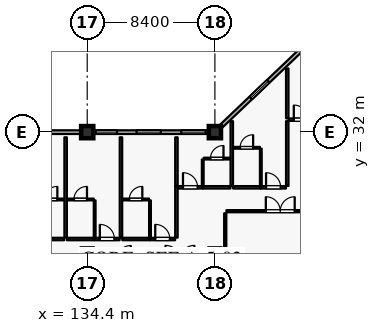
"""IFC4 building model, lengths in metres.
Left out: names, types, materials, properties, quantities, classifications, styles, units other than length and angle.
Written with IfcOpenShell. Run it as: python <this file> out.ifc"""

import sys

from ifc_helpers import new_model, si_unit, direction, frame, frame_2d, origin, origin_2d, place, context, subcontext, project, spatial, rectangle, extrude, element, fill, save


model = new_model("IFC4")
c1 = context("Model", 3, precision=1e-05, world=origin(), true_north=direction((0.0, 1.0)))
c2 = subcontext(c1, "Body", "Model", "MODEL_VIEW")
j1 = project(units=[si_unit("LENGTHUNIT", "METRE"), si_unit("PLANEANGLEUNIT", "RADIAN")], contexts=[c1])
p1 = place(None, origin())
s1 = spatial("IfcSite", under=j1, at=p1, CompositionType="ELEMENT")
p2 = place(p1, origin())
s2 = spatial("IfcBuilding", under=s1, at=p2, CompositionType="ELEMENT")
p3 = place(p2, frame((0.0, 0.0, 11.4)))
s3 = spatial("IfcBuildingStorey", under=s2, at=p3, CompositionType="ELEMENT", Elevation=11.4)
for number, where, z_axis, x_axis in (
    (1, (134.4, 32.0, 0.0), (0.0, 0.0, 1.0), (1.0, 0.0, 0.0)),
    (2, (142.8, 32.0, 0.0), (0.0, 0.0, 1.0), (1.0, 0.0, 0.0)),
):
    element("IfcColumn", number, at=place(p3, frame(where, z_axis=z_axis, x_axis=x_axis)), inside=s3, PredefinedType="COLUMN", context=c2, shape_type="SweptSolid", body=[
        extrude(rectangle(XDim=0.8, YDim=0.8, at=origin_2d()), origin(), (0.0, 0.0, 1.0), 4.8),
    ])
for number, where, z_axis, x_axis in (
    (3, (134.4, 24.0, 0.0), (0.0, 0.0, 1.0), (1.0, 0.0, 0.0)),
    (4, (142.8, 24.0, 0.0), (0.0, 0.0, 1.0), (1.0, 0.0, 0.0)),
):
    element("IfcColumn", number, at=place(p3, frame(where, z_axis=z_axis, x_axis=x_axis)), inside=s3, PredefinedType="COLUMN", context=c2, shape_type="SweptSolid", body=[
        extrude(rectangle(XDim=0.7, YDim=0.7, at=origin_2d()), origin(), (0.0, 0.0, 1.0), 4.8),
    ])
p4 = place(p3, frame((126.4, 32.0, 0.0), z_axis=(0.0, 0.0, 1.0), x_axis=(1.0, 0.0, 0.0)))
e5 = element("IfcWall", 5, at=p4, inside=s3, PredefinedType="SOLIDWALL", context=c2, shape_type="SweptSolid", body=[
    extrude(rectangle(XDim=7.6, YDim=0.24, at=frame_2d((3.8, 0.0))), origin(), (0.0, 0.0, 1.0), 4.1),
])
p5 = place(p4, frame((0.615, 0.0, 0.8)))
e6 = element("IfcOpeningElement", 6, at=p5, cuts=e5, PredefinedType="OPENING", context=c2, shape_type="SweptSolid", body=[
    extrude(rectangle(XDim=1.6, YDim=1.6, at=frame_2d((0.8, 0.8))), frame((0.0, 0.13, 0.0), z_axis=(0.0, -1.0, 0.0), x_axis=(1.0, 0.0, 0.0)), (0.0, 0.0, 1.0), 0.26),
])
p6 = place(p4, frame((3.955, 0.0, 0.8)))
e7 = element("IfcOpeningElement", 7, at=p6, cuts=e5, PredefinedType="OPENING", context=c2, shape_type="SweptSolid", body=[
    extrude(rectangle(XDim=1.6, YDim=1.6, at=frame_2d((0.8, 0.8))), frame((0.0, 0.13, 0.0), z_axis=(0.0, -1.0, 0.0), x_axis=(1.0, 0.0, 0.0)), (0.0, 0.0, 1.0), 0.26),
])
p7 = place(p3, frame((134.8, 32.0, 0.0), z_axis=(0.0, 0.0, 1.0), x_axis=(1.0, 0.0, 0.0)))
e8 = element("IfcWall", 8, at=p7, inside=s3, PredefinedType="SOLIDWALL", context=c2, shape_type="SweptSolid", body=[
    extrude(rectangle(XDim=7.6, YDim=0.24, at=frame_2d((3.8, 0.0))), origin(), (0.0, 0.0, 1.0), 4.13),
])
p8 = place(p7, frame((0.16, 0.0, 0.8)))
e9 = element("IfcOpeningElement", 9, at=p8, cuts=e8, PredefinedType="OPENING", context=c2, shape_type="SweptSolid", body=[
    extrude(rectangle(XDim=1.4, YDim=1.6, at=frame_2d((0.7, 0.8))), frame((0.0, 0.13, 0.0), z_axis=(0.0, -1.0, 0.0), x_axis=(1.0, 0.0, 0.0)), (0.0, 0.0, 1.0), 0.26),
])
p9 = place(p7, frame((2.845, 0.0, 0.8)))
e10 = element("IfcOpeningElement", 10, at=p9, cuts=e8, PredefinedType="OPENING", context=c2, shape_type="SweptSolid", body=[
    extrude(rectangle(XDim=1.6, YDim=1.6, at=frame_2d((0.8, 0.8))), frame((0.0, 0.13, 0.0), z_axis=(0.0, -1.0, 0.0), x_axis=(1.0, 0.0, 0.0)), (0.0, 0.0, 1.0), 0.26),
])
p10 = place(p7, frame((5.785, 0.0, 0.8)))
e11 = element("IfcOpeningElement", 11, at=p10, cuts=e8, PredefinedType="OPENING", context=c2, shape_type="SweptSolid", body=[
    extrude(rectangle(XDim=1.6, YDim=1.6, at=frame_2d((0.8, 0.8))), frame((0.0, 0.13, 0.0), z_axis=(0.0, -1.0, 0.0), x_axis=(1.0, 0.0, 0.0)), (0.0, 0.0, 1.0), 0.26),
])
p11 = place(p3, frame((143.2, 32.381, 0.0), z_axis=(0.0, 0.0, 1.0), x_axis=(0.724156739794, 0.689635422677, 0.0)))
e12 = element("IfcWall", 12, at=p11, inside=s3, PredefinedType="SOLIDWALL", context=c2, shape_type="SweptSolid", body=[
    extrude(rectangle(XDim=10.495, YDim=0.24, at=frame_2d((5.248, 0.0))), origin(), (0.0, 0.0, 1.0), 4.13),
])
p12 = place(p11, frame((2.701, 0.0, 0.8)))
e13 = element("IfcOpeningElement", 13, at=p12, cuts=e12, PredefinedType="OPENING", context=c2, shape_type="SweptSolid", body=[
    extrude(rectangle(XDim=1.6, YDim=1.6, at=frame_2d((0.8, 0.8))), frame((0.0, 0.13, 0.0), z_axis=(0.0, -1.0, 0.0), x_axis=(1.0, 0.0, 0.0)), (0.0, 0.0, 1.0), 0.26),
])
p13 = place(p11, frame((7.527, 0.0, 0.8)))
e14 = element("IfcOpeningElement", 14, at=p13, cuts=e12, PredefinedType="OPENING", context=c2, shape_type="SweptSolid", body=[
    extrude(rectangle(XDim=1.6, YDim=1.6, at=frame_2d((0.8, 0.8))), frame((0.0, 0.13, 0.0), z_axis=(0.0, -1.0, 0.0), x_axis=(1.0, 0.0, 0.0)), (0.0, 0.0, 1.0), 0.26),
])
p14 = place(p3, frame((131.08, 24.97, 0.0), z_axis=(0.0, 0.0, 1.0), x_axis=(1.0, 0.0, 0.0)))
e15 = element("IfcWall", 15, at=p14, inside=s3, PredefinedType="PARTITIONING", context=c2, shape_type="SweptSolid", body=[
    extrude(rectangle(XDim=1.81, YDim=0.16, at=frame_2d((0.905, 0.0))), origin(), (0.0, 0.0, 1.0), 4.535),
])
p15 = place(p3, frame((131.13, 27.57, 0.0), z_axis=(0.0, 0.0, 1.0), x_axis=(1.0, 0.0, 0.0)))
e16 = element("IfcWall", 16, at=p15, inside=s3, PredefinedType="PARTITIONING", context=c2, shape_type="SweptSolid", body=[
    extrude(rectangle(XDim=1.75, YDim=0.115, at=frame_2d((0.875, 0.0))), origin(), (0.0, 0.0, 1.0), 4.535),
])
p16 = place(p15, frame((0.445, 0.0, 0.0)))
e17 = element("IfcOpeningElement", 17, at=p16, cuts=e16, PredefinedType="OPENING", context=c2, shape_type="SweptSolid", body=[
    extrude(rectangle(XDim=0.86, YDim=2.12, at=frame_2d((0.43, 1.06))), frame((0.0, 0.067, 0.0), z_axis=(0.0, -1.0, 0.0), x_axis=(1.0, 0.0, 0.0)), (0.0, 0.0, 1.0), 0.135),
])
p17 = place(p3, frame((133.07, 24.97, 0.0), z_axis=(0.0, 0.0, 1.0), x_axis=(1.0, 0.0, 0.0)))
e18 = element("IfcWall", 18, at=p17, inside=s3, PredefinedType="PARTITIONING", context=c2, shape_type="SweptSolid", body=[
    extrude(rectangle(XDim=1.81, YDim=0.16, at=frame_2d((0.905, 0.0))), origin(), (0.0, 0.0, 1.0), 4.535),
])
p18 = place(p3, frame((134.89, 24.97, 0.0), z_axis=(0.0, 0.0, 1.0), x_axis=(1.0, 0.0, 0.0)))
e19 = element("IfcWall", 19, at=p18, inside=s3, PredefinedType="PARTITIONING", context=c2, shape_type="SweptSolid", body=[
    extrude(rectangle(XDim=1.64, YDim=0.16, at=frame_2d((0.82, 0.0))), origin(), (0.0, 0.0, 1.0), 4.535),
])
p19 = place(p18, frame((0.34, 0.0, 0.0)))
e20 = element("IfcOpeningElement", 20, at=p19, cuts=e19, PredefinedType="OPENING", context=c2, shape_type="SweptSolid", body=[
    extrude(rectangle(XDim=0.96, YDim=2.2, at=frame_2d((0.48, 1.1))), frame((0.0, 0.09, 0.0), z_axis=(0.0, -1.0, 0.0), x_axis=(1.0, 0.0, 0.0)), (0.0, 0.0, 1.0), 0.18),
])
p20 = place(p3, frame((134.89, 25.06, 0.0), z_axis=(0.0, 0.0, 1.0), x_axis=(0.0, 1.0, 0.0)))
e21 = element("IfcWall", 21, at=p20, inside=s3, PredefinedType="PARTITIONING", context=c2, shape_type="SweptSolid", body=[
    extrude(rectangle(XDim=2.45, YDim=0.115, at=frame_2d((1.225, 0.0))), origin(), (0.0, 0.0, 1.0), 4.535),
])
p21 = place(p3, frame((133.08, 27.57, 0.0), z_axis=(0.0, 0.0, 1.0), x_axis=(1.0, 0.0, 0.0)))
e22 = element("IfcWall", 22, at=p21, inside=s3, PredefinedType="PARTITIONING", context=c2, shape_type="SweptSolid", body=[
    extrude(rectangle(XDim=1.75, YDim=0.115, at=frame_2d((0.875, 0.0))), origin(), (0.0, 0.0, 1.0), 4.535),
])
p22 = place(p21, frame((0.445, 0.0, 0.0)))
e23 = element("IfcOpeningElement", 23, at=p22, cuts=e22, PredefinedType="OPENING", context=c2, shape_type="SweptSolid", body=[
    extrude(rectangle(XDim=0.86, YDim=2.12, at=frame_2d((0.43, 1.06))), frame((0.0, 0.067, 0.0), z_axis=(0.0, -1.0, 0.0), x_axis=(1.0, 0.0, 0.0)), (0.0, 0.0, 1.0), 0.135),
])
p23 = place(p3, frame((132.98, 25.06, 0.0), z_axis=(0.0, 0.0, 1.0), x_axis=(0.0, 1.0, 0.0)))
e24 = element("IfcWall", 24, at=p23, inside=s3, PredefinedType="PARTITIONING", context=c2, shape_type="SweptSolid", body=[
    extrude(rectangle(XDim=6.6, YDim=0.16, at=frame_2d((3.3, 0.0))), origin(), (0.0, 0.0, 1.0), 4.535),
])
p24 = place(p3, frame((136.71, 24.97, 0.0), z_axis=(0.0, 0.0, 1.0), x_axis=(1.0, 0.0, 0.0)))
e25 = element("IfcWall", 25, at=p24, inside=s3, PredefinedType="PARTITIONING", context=c2, shape_type="SweptSolid", body=[
    extrude(rectangle(XDim=1.81, YDim=0.16, at=frame_2d((0.905, 0.0))), origin(), (0.0, 0.0, 1.0), 4.535),
])
p25 = place(p3, frame((138.53, 24.97, 0.0), z_axis=(0.0, 0.0, 1.0), x_axis=(1.0, 0.0, 0.0)))
e26 = element("IfcWall", 26, at=p25, inside=s3, PredefinedType="PARTITIONING", context=c2, shape_type="SweptSolid", body=[
    extrude(rectangle(XDim=1.65, YDim=0.16, at=frame_2d((0.825, 0.0))), origin(), (0.0, 0.0, 1.0), 4.535),
])
p26 = place(p25, frame((0.345, 0.0, 0.0)))
e27 = element("IfcOpeningElement", 27, at=p26, cuts=e26, PredefinedType="OPENING", context=c2, shape_type="SweptSolid", body=[
    extrude(rectangle(XDim=0.96, YDim=2.2, at=frame_2d((0.48, 1.1))), frame((0.0, 0.09, 0.0), z_axis=(0.0, -1.0, 0.0), x_axis=(1.0, 0.0, 0.0)), (0.0, 0.0, 1.0), 0.18),
])
p27 = place(p3, frame((138.53, 25.06, 0.0), z_axis=(0.0, 0.0, 1.0), x_axis=(0.0, 1.0, 0.0)))
e28 = element("IfcWall", 28, at=p27, inside=s3, PredefinedType="PARTITIONING", context=c2, shape_type="SweptSolid", body=[
    extrude(rectangle(XDim=2.45, YDim=0.115, at=frame_2d((1.225, 0.0))), origin(), (0.0, 0.0, 1.0), 4.535),
])
p28 = place(p3, frame((136.72, 27.57, 0.0), z_axis=(0.0, 0.0, 1.0), x_axis=(1.0, 0.0, 0.0)))
e29 = element("IfcWall", 29, at=p28, inside=s3, PredefinedType="PARTITIONING", context=c2, shape_type="SweptSolid", body=[
    extrude(rectangle(XDim=1.75, YDim=0.115, at=frame_2d((0.875, 0.0))), origin(), (0.0, 0.0, 1.0), 4.535),
])
p29 = place(p28, frame((0.445, 0.0, 0.0)))
e30 = element("IfcOpeningElement", 30, at=p29, cuts=e29, PredefinedType="OPENING", context=c2, shape_type="SweptSolid", body=[
    extrude(rectangle(XDim=0.86, YDim=2.12, at=frame_2d((0.43, 1.06))), frame((0.0, 0.067, 0.0), z_axis=(0.0, -1.0, 0.0), x_axis=(1.0, 0.0, 0.0)), (0.0, 0.0, 1.0), 0.135),
])
p30 = place(p3, frame((136.62, 25.06, 0.0), z_axis=(0.0, 0.0, 1.0), x_axis=(0.0, 1.0, 0.0)))
e31 = element("IfcWall", 31, at=p30, inside=s3, PredefinedType="PARTITIONING", context=c2, shape_type="SweptSolid", body=[
    extrude(rectangle(XDim=6.6, YDim=0.16, at=frame_2d((3.3, 0.0))), origin(), (0.0, 0.0, 1.0), 4.535),
])
p31 = place(p3, frame((140.27, 25.06, 0.0), z_axis=(0.0, 0.0, 1.0), x_axis=(0.0, 1.0, 0.0)))
e32 = element("IfcWall", 32, at=p31, inside=s3, PredefinedType="PARTITIONING", context=c2, shape_type="SweptSolid", body=[
    extrude(rectangle(XDim=3.39, YDim=0.16, at=frame_2d((1.695, 0.0))), origin(), (0.0, 0.0, 1.0), 4.535),
])
p32 = place(p3, frame((140.36, 28.37, 0.0), z_axis=(0.0, 0.0, 1.0), x_axis=(1.0, 0.0, 0.0)))
e33 = element("IfcWall", 33, at=p32, inside=s3, PredefinedType="PARTITIONING", context=c2, shape_type="SweptSolid", body=[
    extrude(rectangle(XDim=1.64, YDim=0.16, at=frame_2d((0.82, 0.0))), origin(), (0.0, 0.0, 1.0), 4.535),
])
p33 = place(p32, frame((0.34, 0.0, 0.0)))
e34 = element("IfcOpeningElement", 34, at=p33, cuts=e33, PredefinedType="OPENING", context=c2, shape_type="SweptSolid", body=[
    extrude(rectangle(XDim=0.96, YDim=2.2, at=frame_2d((0.48, 1.1))), frame((0.0, 0.09, 0.0), z_axis=(0.0, -1.0, 0.0), x_axis=(1.0, 0.0, 0.0)), (0.0, 0.0, 1.0), 0.18),
])
p34 = place(p3, frame((142.01, 28.37, 0.0), z_axis=(0.0, 0.0, 1.0), x_axis=(1.0, 0.0, 0.0)))
e35 = element("IfcWall", 35, at=p34, inside=s3, PredefinedType="PARTITIONING", context=c2, shape_type="SweptSolid", body=[
    extrude(rectangle(XDim=1.81, YDim=0.16, at=frame_2d((0.905, 0.0))), origin(), (0.0, 0.0, 1.0), 4.535),
])
p35 = place(p3, frame((142.0, 28.46, 0.0), z_axis=(0.0, 0.0, 1.0), x_axis=(0.0, 1.0, 0.0)))
e36 = element("IfcWall", 36, at=p35, inside=s3, PredefinedType="PARTITIONING", context=c2, shape_type="SweptSolid", body=[
    extrude(rectangle(XDim=1.74, YDim=0.115, at=frame_2d((0.87, 0.0))), origin(), (0.0, 0.0, 1.0), 4.535),
])
p36 = place(p3, frame((142.06, 30.26, 0.0), z_axis=(0.0, 0.0, 1.0), x_axis=(1.0, 0.0, 0.0)))
e37 = element("IfcWall", 37, at=p36, inside=s3, PredefinedType="PARTITIONING", context=c2, shape_type="SweptSolid", body=[
    extrude(rectangle(XDim=1.75, YDim=0.115, at=frame_2d((0.875, 0.0))), origin(), (0.0, 0.0, 1.0), 4.535),
])
p37 = place(p36, frame((0.445, 0.0, 0.0)))
e38 = element("IfcOpeningElement", 38, at=p37, cuts=e37, PredefinedType="OPENING", context=c2, shape_type="SweptSolid", body=[
    extrude(rectangle(XDim=0.86, YDim=2.12, at=frame_2d((0.43, 1.06))), frame((0.0, 0.067, 0.0), z_axis=(0.0, -1.0, 0.0), x_axis=(1.0, 0.0, 0.0)), (0.0, 0.0, 1.0), 0.135),
])
p38 = place(p3, frame((140.27, 28.46, 0.0), z_axis=(0.0, 0.0, 1.0), x_axis=(0.0, 1.0, 0.0)))
e39 = element("IfcWall", 39, at=p38, inside=s3, PredefinedType="PARTITIONING", context=c2, shape_type="SweptSolid", body=[
    extrude(rectangle(XDim=3.2, YDim=0.16, at=frame_2d((1.6, 0.0))), origin(), (0.0, 0.0, 1.0), 4.535),
])
p39 = place(p3, frame((144.0, 28.37, 0.0), z_axis=(0.0, 0.0, 1.0), x_axis=(1.0, 0.0, 0.0)))
e40 = element("IfcWall", 40, at=p39, inside=s3, PredefinedType="PARTITIONING", context=c2, shape_type="SweptSolid", body=[
    extrude(rectangle(XDim=1.81, YDim=0.16, at=frame_2d((0.905, 0.0))), origin(), (0.0, 0.0, 1.0), 4.535),
])
p40 = place(p3, frame((145.82, 28.37, 0.0), z_axis=(0.0, 0.0, 1.0), x_axis=(1.0, 0.0, 0.0)))
e41 = element("IfcWall", 41, at=p40, inside=s3, PredefinedType="PARTITIONING", context=c2, shape_type="SweptSolid", body=[
    extrude(rectangle(XDim=1.65, YDim=0.16, at=frame_2d((0.825, 0.0))), origin(), (0.0, 0.0, 1.0), 4.535),
])
p41 = place(p40, frame((0.345, 0.0, 0.0)))
e42 = element("IfcOpeningElement", 42, at=p41, cuts=e41, PredefinedType="OPENING", context=c2, shape_type="SweptSolid", body=[
    extrude(rectangle(XDim=0.96, YDim=2.2, at=frame_2d((0.48, 1.1))), frame((0.0, 0.09, 0.0), z_axis=(0.0, -1.0, 0.0), x_axis=(1.0, 0.0, 0.0)), (0.0, 0.0, 1.0), 0.18),
])
p42 = place(p3, frame((145.82, 28.46, 0.0), z_axis=(0.0, 0.0, 1.0), x_axis=(0.0, 1.0, 0.0)))
e43 = element("IfcWall", 43, at=p42, inside=s3, PredefinedType="PARTITIONING", context=c2, shape_type="SweptSolid", body=[
    extrude(rectangle(XDim=2.45, YDim=0.115, at=frame_2d((1.225, 0.0))), origin(), (0.0, 0.0, 1.0), 4.535),
])
p43 = place(p3, frame((144.01, 30.97, 0.0), z_axis=(0.0, 0.0, 1.0), x_axis=(1.0, 0.0, 0.0)))
e44 = element("IfcWall", 44, at=p43, inside=s3, PredefinedType="PARTITIONING", context=c2, shape_type="SweptSolid", body=[
    extrude(rectangle(XDim=1.75, YDim=0.115, at=frame_2d((0.875, 0.0))), origin(), (0.0, 0.0, 1.0), 4.535),
])
p44 = place(p43, frame((0.445, 0.0, 0.0)))
e45 = element("IfcOpeningElement", 45, at=p44, cuts=e44, PredefinedType="OPENING", context=c2, shape_type="SweptSolid", body=[
    extrude(rectangle(XDim=0.86, YDim=2.12, at=frame_2d((0.43, 1.06))), frame((0.0, 0.067, 0.0), z_axis=(0.0, -1.0, 0.0), x_axis=(1.0, 0.0, 0.0)), (0.0, 0.0, 1.0), 0.135),
])
for number, where, z_axis, x_axis in (
    (46, (143.91, 28.46, 0.0), (0.0, 0.0, 1.0), (0.0, 1.0, 0.0)),
    (47, (147.56, 28.46, 0.0), (0.0, 0.0, 1.0), (0.0, 1.0, 0.0)),
):
    element("IfcWall", number, at=place(p3, frame(where, z_axis=z_axis, x_axis=x_axis)), inside=s3, PredefinedType="PARTITIONING", context=c2, shape_type="SweptSolid", body=[
        extrude(rectangle(XDim=4.26, YDim=0.16, at=frame_2d((2.13, 0.0))), origin(), (0.0, 0.0, 1.0), 4.535),
    ])
p45 = place(p3, frame((147.65, 32.82, 0.0), z_axis=(0.0, 0.0, 1.0), x_axis=(1.0, 0.0, 0.0)))
e48 = element("IfcWall", 48, at=p45, inside=s3, PredefinedType="PARTITIONING", context=c2, shape_type="SweptSolid", body=[
    extrude(rectangle(XDim=1.64, YDim=0.16, at=frame_2d((0.82, 0.0))), origin(), (0.0, 0.0, 1.0), 4.535),
])
p46 = place(p45, frame((0.34, 0.0, 0.0)))
e49 = element("IfcOpeningElement", 49, at=p46, cuts=e48, PredefinedType="OPENING", context=c2, shape_type="SweptSolid", body=[
    extrude(rectangle(XDim=0.96, YDim=2.2, at=frame_2d((0.48, 1.1))), frame((0.0, 0.09, 0.0), z_axis=(0.0, -1.0, 0.0), x_axis=(1.0, 0.0, 0.0)), (0.0, 0.0, 1.0), 0.18),
])
p47 = place(p3, frame((147.56, 32.91, 0.0), z_axis=(0.0, 0.0, 1.0), x_axis=(0.0, 1.0, 0.0)))
e50 = element("IfcWall", 50, at=p47, inside=s3, PredefinedType="PARTITIONING", context=c2, shape_type="SweptSolid", body=[
    extrude(rectangle(XDim=3.28, YDim=0.16, at=frame_2d((1.64, 0.0))), origin(), (0.0, 0.0, 1.0), 4.535),
])
p48 = place(p3, frame((143.56, 26.8, 0.0), z_axis=(0.0, 0.0, 1.0), x_axis=(1.0, 0.0, 0.0)))
e51 = element("IfcWall", 51, at=p48, inside=s3, PredefinedType="PARTITIONING", context=c2, shape_type="SweptSolid", body=[
    extrude(rectangle(XDim=7.08, YDim=0.14, at=frame_2d((3.54, 0.0))), origin(), (0.0, 0.0, 1.0), 4.535),
])
p49 = place(p48, frame((2.59, 0.0, 0.0)))
e52 = element("IfcOpeningElement", 52, at=p49, cuts=e51, PredefinedType="OPENING", context=c2, shape_type="SweptSolid", body=[
    extrude(rectangle(XDim=1.9, YDim=2.4, at=frame_2d((0.95, 1.2))), frame((0.0, 0.08, 0.0), z_axis=(0.0, -1.0, 0.0), x_axis=(1.0, 0.0, 0.0)), (0.0, 0.0, 1.0), 0.16),
])
p50 = place(p3, frame((143.48, 23.45, 0.0), z_axis=(0.0, 0.0, 1.0), x_axis=(0.0, 1.0, 0.0)))
e53 = element("IfcWall", 53, at=p50, inside=s3, PredefinedType="PARTITIONING", context=c2, shape_type="SweptSolid", body=[
    extrude(rectangle(XDim=3.21, YDim=0.14, at=frame_2d((1.605, 0.0))), origin(), (0.0, 0.0, 1.0), 4.535),
])
p51 = place(p8, origin())
e54 = element("IfcWindow", 54, at=p51, inside=s3, PartitioningType="SINGLE_PANEL", PredefinedType="WINDOW", context=c2, shape_type="SweptSolid", body=[
    extrude(rectangle(XDim=1.4, YDim=1.6, at=frame_2d((0.7, 0.8))), frame((0.0, 0.03, 0.0), z_axis=(0.0, -1.0, 0.0), x_axis=(1.0, 0.0, 0.0)), (0.0, 0.0, 1.0), 0.06),
])
fill(e9, e54)
p52 = place(p9, origin())
e55 = element("IfcWindow", 55, at=p52, inside=s3, PartitioningType="SINGLE_PANEL", PredefinedType="WINDOW", context=c2, shape_type="SweptSolid", body=[
    extrude(rectangle(XDim=1.6, YDim=1.6, at=frame_2d((0.8, 0.8))), frame((0.0, 0.03, 0.0), z_axis=(0.0, -1.0, 0.0), x_axis=(1.0, 0.0, 0.0)), (0.0, 0.0, 1.0), 0.06),
])
fill(e10, e55)
p53 = place(p10, origin())
e56 = element("IfcWindow", 56, at=p53, inside=s3, PartitioningType="SINGLE_PANEL", PredefinedType="WINDOW", context=c2, shape_type="SweptSolid", body=[
    extrude(rectangle(XDim=1.6, YDim=1.6, at=frame_2d((0.8, 0.8))), frame((0.0, 0.03, 0.0), z_axis=(0.0, -1.0, 0.0), x_axis=(1.0, 0.0, 0.0)), (0.0, 0.0, 1.0), 0.06),
])
fill(e11, e56)
p54 = place(p12, origin())
e57 = element("IfcWindow", 57, at=p54, inside=s3, PartitioningType="SINGLE_PANEL", PredefinedType="WINDOW", context=c2, shape_type="SweptSolid", body=[
    extrude(rectangle(XDim=1.6, YDim=1.6, at=frame_2d((0.8, 0.8))), frame((0.0, 0.03, 0.0), z_axis=(0.0, -1.0, 0.0), x_axis=(1.0, 0.0, 0.0)), (0.0, 0.0, 1.0), 0.06),
])
fill(e13, e57)
p55 = place(p16, origin())
e58 = element("IfcDoor", 58, at=p55, inside=s3, OperationType="SINGLE_SWING_RIGHT", PredefinedType="DOOR", context=c2, shape_type="SweptSolid", body=[
    extrude(rectangle(XDim=0.86, YDim=2.12, at=frame_2d((0.43, 1.06))), frame((0.0, 0.025, 0.0), z_axis=(0.0, -1.0, 0.0), x_axis=(1.0, 0.0, 0.0)), (0.0, 0.0, 1.0), 0.05),
])
fill(e17, e58)
p56 = place(p19, origin())
e59 = element("IfcDoor", 59, at=p56, inside=s3, OperationType="SINGLE_SWING_LEFT", PredefinedType="DOOR", context=c2, shape_type="SweptSolid", body=[
    extrude(rectangle(XDim=0.96, YDim=2.2, at=frame_2d((0.48, 1.1))), frame((0.0, 0.025, 0.0), z_axis=(0.0, -1.0, 0.0), x_axis=(1.0, 0.0, 0.0)), (0.0, 0.0, 1.0), 0.05),
])
fill(e20, e59)
p57 = place(p22, origin())
e60 = element("IfcDoor", 60, at=p57, inside=s3, OperationType="SINGLE_SWING_RIGHT", PredefinedType="DOOR", context=c2, shape_type="SweptSolid", body=[
    extrude(rectangle(XDim=0.86, YDim=2.12, at=frame_2d((0.43, 1.06))), frame((0.0, 0.025, 0.0), z_axis=(0.0, -1.0, 0.0), x_axis=(1.0, 0.0, 0.0)), (0.0, 0.0, 1.0), 0.05),
])
fill(e23, e60)
p58 = place(p26, origin())
e61 = element("IfcDoor", 61, at=p58, inside=s3, OperationType="SINGLE_SWING_LEFT", PredefinedType="DOOR", context=c2, shape_type="SweptSolid", body=[
    extrude(rectangle(XDim=0.96, YDim=2.2, at=frame_2d((0.48, 1.1))), frame((0.0, 0.025, 0.0), z_axis=(0.0, -1.0, 0.0), x_axis=(1.0, 0.0, 0.0)), (0.0, 0.0, 1.0), 0.05),
])
fill(e27, e61)
p59 = place(p29, origin())
e62 = element("IfcDoor", 62, at=p59, inside=s3, OperationType="SINGLE_SWING_RIGHT", PredefinedType="DOOR", context=c2, shape_type="SweptSolid", body=[
    extrude(rectangle(XDim=0.86, YDim=2.12, at=frame_2d((0.43, 1.06))), frame((0.0, 0.025, 0.0), z_axis=(0.0, -1.0, 0.0), x_axis=(1.0, 0.0, 0.0)), (0.0, 0.0, 1.0), 0.05),
])
fill(e30, e62)
p60 = place(p33, origin())
e63 = element("IfcDoor", 63, at=p60, inside=s3, OperationType="SINGLE_SWING_LEFT", PredefinedType="DOOR", context=c2, shape_type="SweptSolid", body=[
    extrude(rectangle(XDim=0.96, YDim=2.2, at=frame_2d((0.48, 1.1))), frame((0.0, 0.025, 0.0), z_axis=(0.0, -1.0, 0.0), x_axis=(1.0, 0.0, 0.0)), (0.0, 0.0, 1.0), 0.05),
])
fill(e34, e63)
p61 = place(p37, origin())
e64 = element("IfcDoor", 64, at=p61, inside=s3, OperationType="SINGLE_SWING_RIGHT", PredefinedType="DOOR", context=c2, shape_type="SweptSolid", body=[
    extrude(rectangle(XDim=0.86, YDim=2.12, at=frame_2d((0.43, 1.06))), frame((0.0, 0.025, 0.0), z_axis=(0.0, -1.0, 0.0), x_axis=(1.0, 0.0, 0.0)), (0.0, 0.0, 1.0), 0.05),
])
fill(e38, e64)
p62 = place(p41, origin())
e65 = element("IfcDoor", 65, at=p62, inside=s3, OperationType="SINGLE_SWING_LEFT", PredefinedType="DOOR", context=c2, shape_type="SweptSolid", body=[
    extrude(rectangle(XDim=0.96, YDim=2.2, at=frame_2d((0.48, 1.1))), frame((0.0, 0.025, 0.0), z_axis=(0.0, -1.0, 0.0), x_axis=(1.0, 0.0, 0.0)), (0.0, 0.0, 1.0), 0.05),
])
fill(e42, e65)
p63 = place(p44, origin())
e66 = element("IfcDoor", 66, at=p63, inside=s3, OperationType="SINGLE_SWING_RIGHT", PredefinedType="DOOR", context=c2, shape_type="SweptSolid", body=[
    extrude(rectangle(XDim=0.86, YDim=2.12, at=frame_2d((0.43, 1.06))), frame((0.0, 0.025, 0.0), z_axis=(0.0, -1.0, 0.0), x_axis=(1.0, 0.0, 0.0)), (0.0, 0.0, 1.0), 0.05),
])
fill(e45, e66)
p64 = place(p46, origin())
e67 = element("IfcDoor", 67, at=p64, inside=s3, OperationType="SINGLE_SWING_LEFT", PredefinedType="DOOR", context=c2, shape_type="SweptSolid", body=[
    extrude(rectangle(XDim=0.96, YDim=2.2, at=frame_2d((0.48, 1.1))), frame((0.0, 0.025, 0.0), z_axis=(0.0, -1.0, 0.0), x_axis=(1.0, 0.0, 0.0)), (0.0, 0.0, 1.0), 0.05),
])
fill(e49, e67)
p65 = place(p49, origin())
e68 = element("IfcDoor", 68, at=p65, inside=s3, OperationType="DOUBLE_DOOR_SINGLE_SWING", PredefinedType="DOOR", context=c2, shape_type="SweptSolid", body=[
    extrude(rectangle(XDim=1.9, YDim=2.4, at=frame_2d((0.95, 1.2))), frame((0.0, 0.025, 0.0), z_axis=(0.0, -1.0, 0.0), x_axis=(1.0, 0.0, 0.0)), (0.0, 0.0, 1.0), 0.05),
])
fill(e52, e68)
save(model, sys.argv[1])
